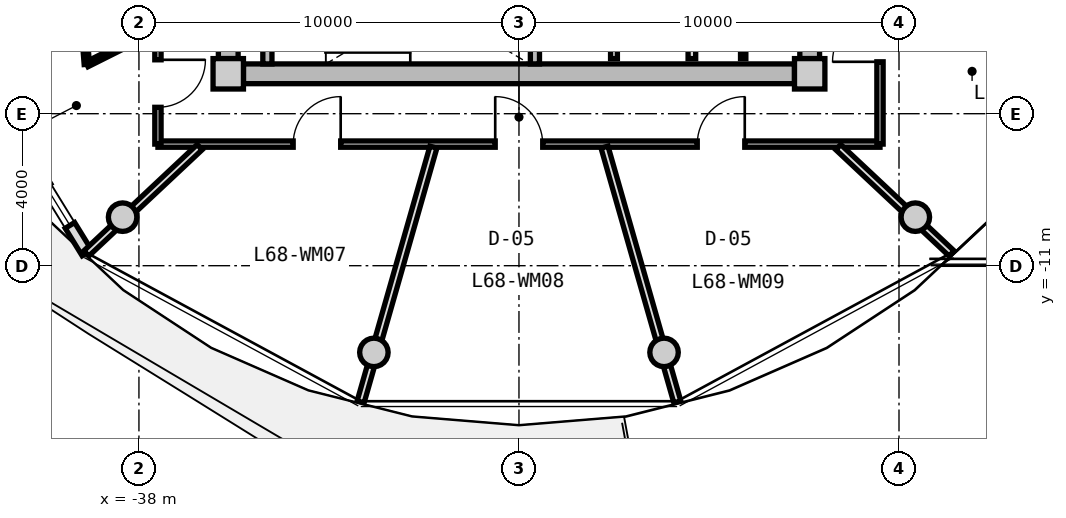
"""IFC4 building model, lengths in metres.
Left out: names, types, materials, properties, quantities, classifications, styles, units other than length and angle.
Written with IfcOpenShell. Run it as: python <this file> out.ifc"""

import sys

from ifc_helpers import new_model, si_unit, direction, frame, frame_2d, origin, origin_2d, place, context, subcontext, project, spatial, rectangle, circle, extrude, source, transform, mapped, element, fill, save


model = new_model("IFC4")
c1 = context("Model", 3, precision=1e-05, world=origin(), true_north=direction((0.0, 1.0)))
c2 = subcontext(c1, "Body", "Model", "MODEL_VIEW")
j1 = project(units=[si_unit("LENGTHUNIT", "METRE"), si_unit("PLANEANGLEUNIT", "RADIAN")], contexts=[c1])
p1 = place(None, origin())
s1 = spatial("IfcSite", under=j1, at=p1, CompositionType="ELEMENT")
p2 = place(p1, origin())
s2 = spatial("IfcBuilding", under=s1, at=p2, CompositionType="ELEMENT")
p3 = place(p2, frame((0.0, 0.0, 220.0)))
s3 = spatial("IfcBuildingStorey", under=s2, at=p3, CompositionType="ELEMENT", Elevation=220.0)
m1 = source(origin(), c2, "Body", "SweptSolid", [
    extrude(rectangle(XDim=0.8, YDim=0.8, at=origin_2d()), origin(), (0.0, 0.0, 1.0), 3.05),
])
for number, where, z_axis, x_axis in (
    (1, (-35.65, -5.95, 0.0), (0.0, 0.0, 1.0), (1.0, 0.0, 0.0)),
    (2, (-20.35, -5.95, 0.0), (0.0, 0.0, 1.0), (1.0, 0.0, 0.0)),
):
    element("IfcColumn", number, at=place(p3, frame(where, z_axis=z_axis, x_axis=x_axis)), inside=s3, PredefinedType="COLUMN", context=c2, shape_type="MappedRepresentation", body=[
        mapped(m1, transform((0.0, 0.0, 0.0), x_axis=(1.0, 0.0, 0.0), y_axis=(0.0, 1.0, 0.0), z_axis=(0.0, 0.0, 1.0), scale=1.0)),
    ])
m2 = source(origin(), c2, "Body", "SweptSolid", [
    extrude(rectangle(XDim=14.5, YDim=0.52, at=frame_2d((7.25, 0.0))), origin(), (0.0, 0.0, 1.0), 2.76),
])
p4 = place(p3, frame((-20.75, -5.95, 0.0), z_axis=(0.0, 0.0, 1.0), x_axis=(-1.0, 0.0, 0.0)))
e3 = element("IfcWall", 3, at=p4, inside=s3, PredefinedType="SHEAR", context=c2, shape_type="MappedRepresentation", body=[
    mapped(m2, transform((0.0, 0.0, 0.0), x_axis=(1.0, 0.0, 0.0), y_axis=(0.0, 1.0, 0.0), z_axis=(0.0, 0.0, 1.0), scale=1.0)),
])
m3 = source(origin(), c2, "Body", "SweptSolid", [
    extrude(rectangle(XDim=11.1, YDim=0.52, at=frame_2d((5.55, 0.0))), origin(), (0.0, 0.0, 1.0), 2.76),
])
p5 = place(p3, frame((-35.65, -5.55, 0.0), z_axis=(0.0, 0.0, 1.0), x_axis=(0.0, 1.0, 0.0)))
e4 = element("IfcWall", 4, at=p5, inside=s3, PredefinedType="SHEAR", context=c2, shape_type="MappedRepresentation", body=[
    mapped(m3, transform((0.0, 0.0, 0.0), x_axis=(1.0, 0.0, 0.0), y_axis=(0.0, 1.0, 0.0), z_axis=(0.0, 0.0, 1.0), scale=1.0)),
])
p6 = place(p5, frame((3.8, 0.0, 0.0)))
e5 = element("IfcOpeningElement", 5, at=p6, cuts=e4, PredefinedType="OPENING", context=c2, shape_type="SweptSolid", body=[
    extrude(rectangle(XDim=1.2, YDim=2.15, at=frame_2d((0.6, 1.075))), frame((0.0, 0.27, 0.0), z_axis=(0.0, -1.0, 0.0), x_axis=(1.0, 0.0, 0.0)), (0.0, 0.0, 1.0), 0.54),
])
p7 = place(p3, frame((-20.35, 5.55, 0.0), z_axis=(0.0, 0.0, 1.0), x_axis=(0.0, -1.0, 0.0)))
e6 = element("IfcWall", 6, at=p7, inside=s3, PredefinedType="SHEAR", context=c2, shape_type="MappedRepresentation", body=[
    mapped(m3, transform((0.0, 0.0, 0.0), x_axis=(1.0, 0.0, 0.0), y_axis=(0.0, 1.0, 0.0), z_axis=(0.0, 0.0, 1.0), scale=1.0)),
])
p8 = place(p7, frame((5.65, 0.0, 0.0)))
e7 = element("IfcOpeningElement", 7, at=p8, cuts=e6, PredefinedType="OPENING", context=c2, shape_type="SweptSolid", body=[
    extrude(rectangle(XDim=1.2, YDim=2.15, at=frame_2d((0.6, 1.075))), frame((0.0, 0.27, 0.0), z_axis=(0.0, -1.0, 0.0), x_axis=(1.0, 0.0, 0.0)), (0.0, 0.0, 1.0), 0.54),
])
m4 = source(origin(), c2, "Body", "SweptSolid", [
    extrude(circle(Radius=0.375, at=origin_2d()), origin(), (0.0, 0.0, 1.0), 3.05),
])
for number, where, z_axis, x_axis in (
    (8, (-38.43, -9.723, 0.0), (0.0, 0.0, 1.0), (1.0, 0.0, 0.0)),
    (9, (-31.818, -13.281, 0.0), (0.0, 0.0, 1.0), (1.0, 0.0, 0.0)),
    (10, (-24.182, -13.281, 0.0), (0.0, 0.0, 1.0), (1.0, 0.0, 0.0)),
    (11, (-17.57, -9.723, 0.0), (0.0, 0.0, 1.0), (1.0, 0.0, 0.0)),
):
    element("IfcColumn", number, at=place(p3, frame(where, z_axis=z_axis, x_axis=x_axis)), inside=s3, PredefinedType="COLUMN", context=c2, shape_type="MappedRepresentation", body=[
        mapped(m4, transform((0.0, 0.0, 0.0), x_axis=(1.0, 0.0, 0.0), y_axis=(0.0, 1.0, 0.0), z_axis=(0.0, 0.0, 1.0), scale=1.0)),
    ])
m5 = source(origin(), c2, "Body", "SweptSolid", [
    extrude(rectangle(XDim=7.938, YDim=0.29, at=frame_2d((3.969, 0.0))), origin(), (0.0, 0.0, 1.0), 2.76),
])
p9 = place(p3, frame((-39.37, -10.663, 0.0), z_axis=(0.0, 0.0, 1.0), x_axis=(-0.524244987663, 0.851567491694, 0.0)))
e12 = element("IfcWall", 12, at=p9, inside=s3, PredefinedType="SOLIDWALL", context=c2, shape_type="MappedRepresentation", body=[
    mapped(m5, transform((0.0, 0.0, 0.0), x_axis=(1.0, 0.0, 0.0), y_axis=(0.0, 1.0, 0.0), z_axis=(0.0, 0.0, 1.0), scale=1.0)),
])
p10 = place(p9, frame((5.86, 0.0, 0.0)))
e13 = element("IfcOpeningElement", 13, at=p10, cuts=e12, PredefinedType="OPENING", context=c2, shape_type="SweptSolid", body=[
    extrude(rectangle(XDim=1.15, YDim=2.25, at=frame_2d((0.575, 1.125))), frame((0.0, 0.155, 0.0), z_axis=(0.0, -1.0, 0.0), x_axis=(1.0, 0.0, 0.0)), (0.0, 0.0, 1.0), 0.31),
])
p11 = place(p9, frame((0.85, 0.0, 0.85)))
e14 = element("IfcOpeningElement", 14, at=p11, cuts=e12, PredefinedType="OPENING", context=c2, shape_type="SweptSolid", body=[
    extrude(rectangle(XDim=1.2, YDim=1.5, at=frame_2d((0.6, 0.75))), frame((0.0, 0.155, 0.0), z_axis=(0.0, -1.0, 0.0), x_axis=(1.0, 0.0, 0.0)), (0.0, 0.0, 1.0), 0.31),
])
m6 = source(origin(), c2, "Body", "SweptSolid", [
    extrude(rectangle(XDim=3.24, YDim=0.24, at=frame_2d((1.62, 0.0))), origin(), (0.0, 0.0, 1.0), 2.76),
])
for number, where, z_axis, x_axis in (
    (15, (-34.62, -5.69, 0.0), (0.0, 0.0, 1.0), (0.0, 1.0, 0.0)),
    (16, (-27.58, -5.69, 0.0), (0.0, 0.0, 1.0), (0.0, 1.0, 0.0)),
):
    element("IfcWall", number, at=place(p3, frame(where, z_axis=z_axis, x_axis=x_axis)), inside=s3, PredefinedType="PARTITIONING", context=c2, shape_type="MappedRepresentation", body=[
        mapped(m6, transform((0.0, 0.0, 0.0), x_axis=(1.0, 0.0, 0.0), y_axis=(0.0, 1.0, 0.0), z_axis=(0.0, 0.0, 1.0), scale=1.0)),
    ])
m7 = source(origin(), c2, "Body", "SweptSolid", [
    extrude(rectangle(XDim=3.8, YDim=0.2, at=frame_2d((1.9, 0.0))), origin(), (0.0, 0.0, 1.0), 2.745),
])
p12 = place(p3, frame((-23.45, -5.55, 0.0), z_axis=(0.0, 0.0, 1.0), x_axis=(0.0, 1.0, 0.0)))
e17 = element("IfcWall", 17, at=p12, inside=s3, PredefinedType="PARTITIONING", context=c2, shape_type="MappedRepresentation", body=[
    mapped(m7, transform((0.0, 0.0, 0.0), x_axis=(1.0, 0.0, 0.0), y_axis=(0.0, 1.0, 0.0), z_axis=(0.0, 0.0, 1.0), scale=1.0)),
])
m8 = source(origin(), c2, "Body", "SweptSolid", [
    extrude(rectangle(XDim=4.2, YDim=0.18, at=frame_2d((2.1, 0.0))), origin(), (0.0, 0.0, 1.0), 2.745),
])
p13 = place(p3, frame((-25.5, -5.55, 0.0), z_axis=(0.0, 0.0, 1.0), x_axis=(0.0, 1.0, 0.0)))
e18 = element("IfcWall", 18, at=p13, inside=s3, PredefinedType="PARTITIONING", context=c2, shape_type="MappedRepresentation", body=[
    mapped(m8, transform((0.0, 0.0, 0.0), x_axis=(1.0, 0.0, 0.0), y_axis=(0.0, 1.0, 0.0), z_axis=(0.0, 0.0, 1.0), scale=1.0)),
])
m9 = source(origin(), c2, "Body", "SweptSolid", [
    extrude(rectangle(XDim=3.8, YDim=0.14, at=frame_2d((1.9, 0.0))), origin(), (0.0, 0.0, 1.0), 2.745),
])
p14 = place(p3, frame((-22.1, -5.55, 0.0), z_axis=(0.0, 0.0, 1.0), x_axis=(0.0, 1.0, 0.0)))
e19 = element("IfcWall", 19, at=p14, inside=s3, PredefinedType="PARTITIONING", context=c2, shape_type="MappedRepresentation", body=[
    mapped(m9, transform((0.0, 0.0, 0.0), x_axis=(1.0, 0.0, 0.0), y_axis=(0.0, 1.0, 0.0), z_axis=(0.0, 0.0, 1.0), scale=1.0)),
])
m10 = source(origin(), c2, "Body", "SweptSolid", [
    extrude(rectangle(XDim=19.0, YDim=0.165, at=frame_2d((9.5, 0.0))), origin(), (0.0, 0.0, 1.0), 2.745),
])
p15 = place(p3, frame((-18.5, -7.8, 0.0), z_axis=(0.0, 0.0, 1.0), x_axis=(-1.0, 0.0, 0.0)))
e20 = element("IfcWall", 20, at=p15, inside=s3, PredefinedType="PARTITIONING", context=c2, shape_type="MappedRepresentation", body=[
    mapped(m10, transform((0.0, 0.0, 0.0), x_axis=(1.0, 0.0, 0.0), y_axis=(0.0, 1.0, 0.0), z_axis=(0.0, 0.0, 1.0), scale=1.0)),
])
p16 = place(p15, frame((14.191, 0.0, 0.0)))
e21 = element("IfcOpeningElement", 21, at=p16, cuts=e20, PredefinedType="OPENING", context=c2, shape_type="SweptSolid", body=[
    extrude(rectangle(XDim=1.25, YDim=2.2, at=frame_2d((0.625, 1.1))), frame((0.0, 0.093, 0.0), z_axis=(0.0, -1.0, 0.0), x_axis=(1.0, 0.0, 0.0)), (0.0, 0.0, 1.0), 0.185),
])
p17 = place(p15, frame((8.875, 0.0, 0.0)))
e22 = element("IfcOpeningElement", 22, at=p17, cuts=e20, PredefinedType="OPENING", context=c2, shape_type="SweptSolid", body=[
    extrude(rectangle(XDim=1.25, YDim=2.2, at=frame_2d((0.625, 1.1))), frame((0.0, 0.093, 0.0), z_axis=(0.0, -1.0, 0.0), x_axis=(1.0, 0.0, 0.0)), (0.0, 0.0, 1.0), 0.185),
])
p18 = place(p15, frame((3.559, 0.0, 0.0)))
e23 = element("IfcOpeningElement", 23, at=p18, cuts=e20, PredefinedType="OPENING", context=c2, shape_type="SweptSolid", body=[
    extrude(rectangle(XDim=1.25, YDim=2.2, at=frame_2d((0.625, 1.1))), frame((0.0, 0.093, 0.0), z_axis=(0.0, -1.0, 0.0), x_axis=(1.0, 0.0, 0.0)), (0.0, 0.0, 1.0), 0.185),
])
m11 = source(origin(), c2, "Body", "SweptSolid", [
    extrude(rectangle(XDim=6.88, YDim=0.165, at=frame_2d((3.44, 0.0))), origin(), (0.0, 0.0, 1.0), 2.745),
])
p19 = place(p3, frame((-37.5, -7.8, 0.0), z_axis=(0.0, 0.0, 1.0), x_axis=(0.0, 1.0, 0.0)))
e24 = element("IfcWall", 24, at=p19, inside=s3, PredefinedType="PARTITIONING", context=c2, shape_type="MappedRepresentation", body=[
    mapped(m11, transform((0.0, 0.0, 0.0), x_axis=(1.0, 0.0, 0.0), y_axis=(0.0, 1.0, 0.0), z_axis=(0.0, 0.0, 1.0), scale=1.0)),
])
p20 = place(p19, frame((0.968, 0.0, 0.0)))
e25 = element("IfcOpeningElement", 25, at=p20, cuts=e24, PredefinedType="OPENING", context=c2, shape_type="SweptSolid", body=[
    extrude(rectangle(XDim=1.25, YDim=2.2, at=frame_2d((0.625, 1.1))), frame((0.0, 0.093, 0.0), z_axis=(0.0, -1.0, 0.0), x_axis=(1.0, 0.0, 0.0)), (0.0, 0.0, 1.0), 0.185),
])
p21 = place(p3, frame((-18.5, -0.92, 0.0), z_axis=(0.0, 0.0, 1.0), x_axis=(0.0, -1.0, 0.0)))
e26 = element("IfcWall", 26, at=p21, inside=s3, PredefinedType="PARTITIONING", context=c2, shape_type="MappedRepresentation", body=[
    mapped(m11, transform((0.0, 0.0, 0.0), x_axis=(1.0, 0.0, 0.0), y_axis=(0.0, 1.0, 0.0), z_axis=(0.0, 0.0, 1.0), scale=1.0)),
])
p22 = place(p21, frame((3.464, 0.0, 0.0)))
e27 = element("IfcOpeningElement", 27, at=p22, cuts=e26, PredefinedType="OPENING", context=c2, shape_type="SweptSolid", body=[
    extrude(rectangle(XDim=1.25, YDim=2.2, at=frame_2d((0.625, 1.1))), frame((0.0, 0.093, 0.0), z_axis=(0.0, -1.0, 0.0), x_axis=(1.0, 0.0, 0.0)), (0.0, 0.0, 1.0), 0.185),
])
m12 = source(origin(), c2, "Body", "SweptSolid", [
    extrude(rectangle(XDim=4.089, YDim=0.19, at=frame_2d((2.044, 0.0))), origin(), (0.0, 0.0, 1.0), 2.385),
])
p23 = place(p3, frame((-36.402, -7.88, 0.0), z_axis=(0.0, 0.0, 1.0), x_axis=(-0.729401273609, -0.684086092577, 0.0)))
e28 = element("IfcWall", 28, at=p23, inside=s3, PredefinedType="PARTITIONING", context=c2, shape_type="MappedRepresentation", body=[
    mapped(m12, transform((0.0, 0.0, 0.0), x_axis=(1.0, 0.0, 0.0), y_axis=(0.0, 1.0, 0.0), z_axis=(0.0, 0.0, 1.0), scale=1.0)),
])
m13 = source(origin(), c2, "Body", "SweptSolid", [
    extrude(rectangle(XDim=2.06, YDim=0.14, at=frame_2d((1.03, 0.0))), origin(), (0.0, 0.0, 1.0), 2.745),
])
p24 = place(p3, frame((-37.53, -4.778, 0.0), z_axis=(0.0, 0.0, 1.0), x_axis=(-0.893952568722, -0.448161583444, 0.0)))
e29 = element("IfcWall", 29, at=p24, inside=s3, PredefinedType="PARTITIONING", context=c2, shape_type="MappedRepresentation", body=[
    mapped(m13, transform((0.0, 0.0, 0.0), x_axis=(1.0, 0.0, 0.0), y_axis=(0.0, 1.0, 0.0), z_axis=(0.0, 0.0, 1.0), scale=1.0)),
])
m14 = source(origin(), c2, "Body", "SweptSolid", [
    extrude(rectangle(XDim=2.798, YDim=0.14, at=frame_2d((1.399, 0.0))), origin(), (0.0, 0.0, 1.0), 2.745),
])
p25 = place(p3, frame((-39.371, -5.701, 0.0), z_axis=(0.0, 0.0, 1.0), x_axis=(-0.077823984089, 0.996967114553, 0.0)))
e30 = element("IfcWall", 30, at=p25, inside=s3, PredefinedType="PARTITIONING", context=c2, shape_type="MappedRepresentation", body=[
    mapped(m14, transform((0.0, 0.0, 0.0), x_axis=(1.0, 0.0, 0.0), y_axis=(0.0, 1.0, 0.0), z_axis=(0.0, 0.0, 1.0), scale=1.0)),
])
p26 = place(p25, frame((0.939, 0.0, 0.0)))
e31 = element("IfcOpeningElement", 31, at=p26, cuts=e30, PredefinedType="OPENING", context=c2, shape_type="SweptSolid", body=[
    extrude(rectangle(XDim=0.92, YDim=2.1, at=frame_2d((0.46, 1.05))), frame((0.0, 0.08, 0.0), z_axis=(0.0, -1.0, 0.0), x_axis=(1.0, 0.0, 0.0)), (0.0, 0.0, 1.0), 0.16),
])
m15 = source(origin(), c2, "Body", "SweptSolid", [
    extrude(rectangle(XDim=6.974, YDim=0.19, at=frame_2d((3.487, 0.0))), origin(), (0.0, 0.0, 1.0), 2.345),
])
for number, where, z_axis, x_axis in (
    (32, (-30.251, -7.88, 0.0), (0.0, 0.0, 1.0), (-0.275, -0.962, 0.0)),
    (33, (-25.749, -7.88, 0.0), (0.0, 0.0, 1.0), (0.275, -0.962, 0.0)),
):
    element("IfcWall", number, at=place(p3, frame(where, z_axis=z_axis, x_axis=x_axis)), inside=s3, PredefinedType="PARTITIONING", context=c2, shape_type="MappedRepresentation", body=[
        mapped(m15, transform((0.0, 0.0, 0.0), x_axis=(1.0, 0.0, 0.0), y_axis=(0.0, 1.0, 0.0), z_axis=(0.0, 0.0, 1.0), scale=1.0)),
    ])
m16 = source(origin(), c2, "Body", "SweptSolid", [
    extrude(rectangle(XDim=4.089, YDim=0.19, at=frame_2d((2.044, 0.0))), origin(), (0.0, 0.0, 1.0), 2.345),
])
p27 = place(p3, frame((-19.598, -7.88, 0.0), z_axis=(0.0, 0.0, 1.0), x_axis=(0.729401273609, -0.684086092577, 0.0)))
e34 = element("IfcWall", 34, at=p27, inside=s3, PredefinedType="PARTITIONING", context=c2, shape_type="MappedRepresentation", body=[
    mapped(m16, transform((0.0, 0.0, 0.0), x_axis=(1.0, 0.0, 0.0), y_axis=(0.0, 1.0, 0.0), z_axis=(0.0, 0.0, 1.0), scale=1.0)),
])
m17 = source(origin(), c2, "Body", "SweptSolid", [
    extrude(rectangle(XDim=1.2, YDim=1.5, at=frame_2d((0.6, 0.75))), frame((0.0, 0.03, 0.0), z_axis=(0.0, -1.0, 0.0), x_axis=(1.0, 0.0, 0.0)), (0.0, 0.0, 1.0), 0.06),
])
p28 = place(p11, origin())
e35 = element("IfcWindow", 35, at=p28, inside=s3, PartitioningType="SINGLE_PANEL", PredefinedType="WINDOW", context=c2, shape_type="MappedRepresentation", body=[
    mapped(m17, transform((0.0, 0.0, 0.0), x_axis=(1.0, 0.0, 0.0), y_axis=(0.0, 1.0, 0.0), z_axis=(0.0, 0.0, 1.0), scale=1.0)),
])
fill(e14, e35)
m18 = source(origin(), c2, "Body", "SweptSolid", [
    extrude(rectangle(XDim=1.25, YDim=2.2, at=frame_2d((0.625, 1.1))), frame((0.0, 0.025, 0.0), z_axis=(0.0, -1.0, 0.0), x_axis=(1.0, 0.0, 0.0)), (0.0, 0.0, 1.0), 0.05),
])
p29 = place(p20, frame((1.25, 0.0, 0.0), z_axis=(0.0, 0.0, 1.0), x_axis=(-1.0, 0.0, 0.0)))
e36 = element("IfcDoor", 36, at=p29, inside=s3, OperationType="SINGLE_SWING_LEFT", PredefinedType="DOOR", context=c2, shape_type="MappedRepresentation", body=[
    mapped(m18, transform((0.0, 0.0, 0.0), x_axis=(1.0, 0.0, 0.0), y_axis=(0.0, 1.0, 0.0), z_axis=(0.0, 0.0, 1.0), scale=1.0)),
])
fill(e25, e36)
p30 = place(p16, frame((1.25, 0.0, 0.0), z_axis=(0.0, 0.0, 1.0), x_axis=(-1.0, 0.0, 0.0)))
e37 = element("IfcDoor", 37, at=p30, inside=s3, OperationType="SINGLE_SWING_RIGHT", PredefinedType="DOOR", context=c2, shape_type="MappedRepresentation", body=[
    mapped(m18, transform((0.0, 0.0, 0.0), x_axis=(1.0, 0.0, 0.0), y_axis=(0.0, 1.0, 0.0), z_axis=(0.0, 0.0, 1.0), scale=1.0)),
])
fill(e21, e37)
p31 = place(p17, frame((1.25, 0.0, 0.0), z_axis=(0.0, 0.0, 1.0), x_axis=(-1.0, 0.0, 0.0)))
e38 = element("IfcDoor", 38, at=p31, inside=s3, OperationType="SINGLE_SWING_LEFT", PredefinedType="DOOR", context=c2, shape_type="MappedRepresentation", body=[
    mapped(m18, transform((0.0, 0.0, 0.0), x_axis=(1.0, 0.0, 0.0), y_axis=(0.0, 1.0, 0.0), z_axis=(0.0, 0.0, 1.0), scale=1.0)),
])
fill(e22, e38)
p32 = place(p18, frame((1.25, 0.0, 0.0), z_axis=(0.0, 0.0, 1.0), x_axis=(-1.0, 0.0, 0.0)))
e39 = element("IfcDoor", 39, at=p32, inside=s3, OperationType="SINGLE_SWING_RIGHT", PredefinedType="DOOR", context=c2, shape_type="MappedRepresentation", body=[
    mapped(m18, transform((0.0, 0.0, 0.0), x_axis=(1.0, 0.0, 0.0), y_axis=(0.0, 1.0, 0.0), z_axis=(0.0, 0.0, 1.0), scale=1.0)),
])
fill(e23, e39)
p33 = place(p22, frame((1.25, 0.0, 0.0), z_axis=(0.0, 0.0, 1.0), x_axis=(-1.0, 0.0, 0.0)))
e40 = element("IfcDoor", 40, at=p33, inside=s3, OperationType="SINGLE_SWING_LEFT", PredefinedType="DOOR", context=c2, shape_type="MappedRepresentation", body=[
    mapped(m18, transform((0.0, 0.0, 0.0), x_axis=(1.0, 0.0, 0.0), y_axis=(0.0, 1.0, 0.0), z_axis=(0.0, 0.0, 1.0), scale=1.0)),
])
fill(e27, e40)
save(model, sys.argv[1])
